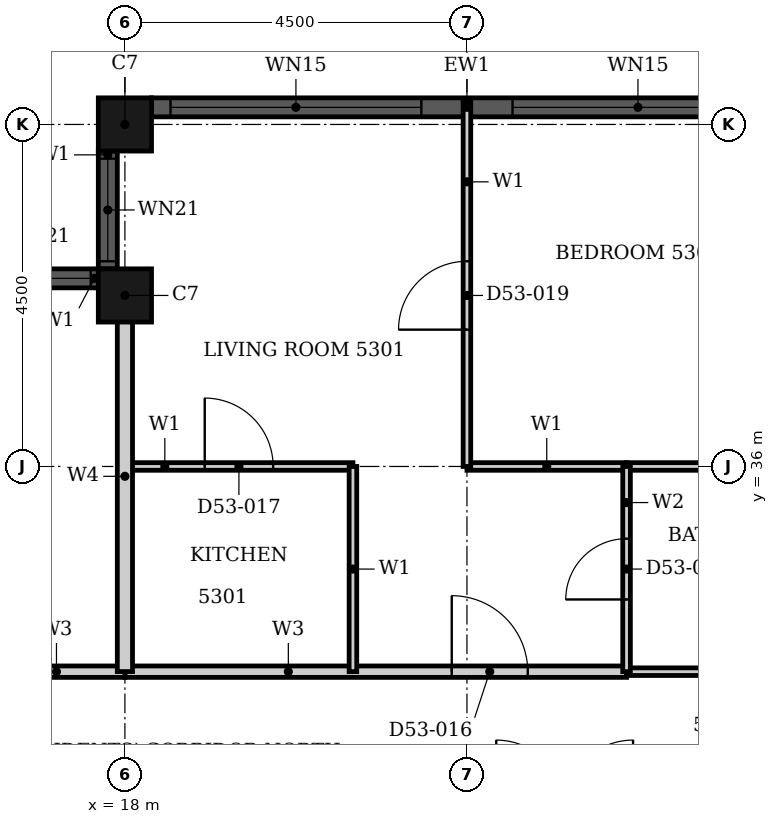
"""IFC4 building model, lengths in metres.
Left out: names, types, materials, properties, quantities, classifications, styles, units other than length and angle.
Written with IfcOpenShell. Run it as: python <this file> out.ifc"""

import sys

from ifc_helpers import new_model, si_unit, direction, frame, frame_2d, origin, origin_2d, place, context, subcontext, project, spatial, rectangle, hollow_rectangle, extrude, element, fill, save


model = new_model("IFC4")
c1 = context("Model", 3, precision=1e-05, world=origin(), true_north=direction((0.0, 1.0)))
c2 = subcontext(c1, "Body", "Model", "MODEL_VIEW")
j1 = project(units=[si_unit("LENGTHUNIT", "METRE"), si_unit("PLANEANGLEUNIT", "RADIAN")], contexts=[c1])
p1 = place(None, origin())
s1 = spatial("IfcSite", under=j1, at=p1, CompositionType="ELEMENT")
p2 = place(p1, origin())
s2 = spatial("IfcBuilding", under=s1, at=p2, CompositionType="ELEMENT")
p3 = place(p2, frame((0.0, 0.0, 210.9)))
s3 = spatial("IfcBuildingStorey", under=s2, at=p3, CompositionType="ELEMENT", Elevation=210.9)
for number, where, z_axis, x_axis in (
    (1, (18.0, 40.5, 0.0), (0.0, 0.0, 1.0), (1.0, 0.0, 0.0)),
    (2, (18.0, 38.25, 0.0), (0.0, 0.0, 1.0), (1.0, 0.0, 0.0)),
):
    element("IfcColumn", number, at=place(p3, frame(where, z_axis=z_axis, x_axis=x_axis)), inside=s3, PredefinedType="COLUMN", context=c2, shape_type="SweptSolid", body=[
        extrude(hollow_rectangle(XDim=0.7, YDim=0.7, WallThickness=0.022, at=origin_2d()), origin(), (0.0, 0.0, 1.0), 3.7),
    ])
p4 = place(p3, frame((26.65, 40.725, 0.0), z_axis=(0.0, 0.0, 1.0), x_axis=(-1.0, 0.0, 0.0)))
e3 = element("IfcWall", 3, at=p4, inside=s3, PredefinedType="SOLIDWALL", context=c2, shape_type="SweptSolid", body=[
    extrude(rectangle(XDim=8.3, YDim=0.25, at=frame_2d((4.15, 0.0))), origin(), (0.0, 0.0, 1.0), 3.7),
])
p5 = place(p4, frame((0.25, 0.0, 0.45)))
e4 = element("IfcOpeningElement", 4, at=p5, cuts=e3, PredefinedType="OPENING", context=c2, shape_type="SweptSolid", body=[
    extrude(rectangle(XDim=3.3, YDim=2.3, at=frame_2d((1.65, 1.15))), frame((0.0, 0.135, 0.0), z_axis=(0.0, -1.0, 0.0), x_axis=(1.0, 0.0, 0.0)), (0.0, 0.0, 1.0), 0.27),
])
p6 = place(p4, frame((4.75, 0.0, 0.45)))
e5 = element("IfcOpeningElement", 5, at=p6, cuts=e3, PredefinedType="OPENING", context=c2, shape_type="SweptSolid", body=[
    extrude(rectangle(XDim=3.3, YDim=2.3, at=frame_2d((1.65, 1.15))), frame((0.0, 0.135, 0.0), z_axis=(0.0, -1.0, 0.0), x_axis=(1.0, 0.0, 0.0)), (0.0, 0.0, 1.0), 0.27),
])
p7 = place(p3, frame((17.775, 40.15, 0.0), z_axis=(0.0, 0.0, 1.0), x_axis=(0.0, -1.0, 0.0)))
e6 = element("IfcWall", 6, at=p7, inside=s3, PredefinedType="SOLIDWALL", context=c2, shape_type="SweptSolid", body=[
    extrude(rectangle(XDim=1.55, YDim=0.25, at=frame_2d((0.775, 0.0))), origin(), (0.0, 0.0, 1.0), 3.7),
])
p8 = place(p7, frame((0.1, 0.0, 0.9)))
e7 = element("IfcOpeningElement", 7, at=p8, cuts=e6, PredefinedType="OPENING", context=c2, shape_type="SweptSolid", body=[
    extrude(rectangle(XDim=1.35, YDim=1.85, at=frame_2d((0.675, 0.925))), frame((0.0, 0.135, 0.0), z_axis=(0.0, -1.0, 0.0), x_axis=(1.0, 0.0, 0.0)), (0.0, 0.0, 1.0), 0.27),
])
p9 = place(p3, frame((17.65, 38.475, 0.0), z_axis=(0.0, 0.0, 1.0), x_axis=(-1.0, 0.0, 0.0)))
e8 = element("IfcWall", 8, at=p9, inside=s3, PredefinedType="SOLIDWALL", context=c2, shape_type="SweptSolid", body=[
    extrude(rectangle(XDim=1.55, YDim=0.25, at=frame_2d((0.775, 0.0))), origin(), (0.0, 0.0, 1.0), 3.7),
])
p10 = place(p9, frame((0.1, 0.0, 0.9)))
e9 = element("IfcOpeningElement", 9, at=p10, cuts=e8, PredefinedType="OPENING", context=c2, shape_type="SweptSolid", body=[
    extrude(rectangle(XDim=1.35, YDim=1.85, at=frame_2d((0.675, 0.925))), frame((0.0, 0.135, 0.0), z_axis=(0.0, -1.0, 0.0), x_axis=(1.0, 0.0, 0.0)), (0.0, 0.0, 1.0), 0.27),
])
p11 = place(p3, frame((18.0, 33.3, 0.0), z_axis=(0.0, 0.0, 1.0), x_axis=(1.0, 0.0, 0.0)))
e10 = element("IfcWall", 10, at=p11, inside=s3, PredefinedType="PARTITIONING", context=c2, shape_type="SweptSolid", body=[
    extrude(rectangle(XDim=6.6, YDim=0.15, at=frame_2d((3.3, 0.0))), origin(), (0.0, 0.0, 1.0), 3.4),
])
p12 = place(p11, frame((4.3, 0.0, 0.0)))
e11 = element("IfcOpeningElement", 11, at=p12, cuts=e10, PredefinedType="OPENING", context=c2, shape_type="SweptSolid", body=[
    extrude(rectangle(XDim=1.0, YDim=2.2, at=frame_2d((0.5, 1.1))), frame((0.0, 0.085, 0.0), z_axis=(0.0, -1.0, 0.0), x_axis=(1.0, 0.0, 0.0)), (0.0, 0.0, 1.0), 0.17),
])
p13 = place(p3, frame((16.2, 33.3, 0.0), z_axis=(0.0, 0.0, 1.0), x_axis=(1.0, 0.0, 0.0)))
e12 = element("IfcWall", 12, at=p13, inside=s3, PredefinedType="PARTITIONING", context=c2, shape_type="SweptSolid", body=[
    extrude(rectangle(XDim=1.799, YDim=0.15, at=frame_2d((0.899, 0.0))), origin(), (0.0, 0.0, 1.0), 3.4),
])
p14 = place(p3, frame((22.5, 36.0, 0.0), z_axis=(0.0, 0.0, 1.0), x_axis=(1.0, 0.0, 0.0)))
e13 = element("IfcWall", 13, at=p14, inside=s3, PredefinedType="PARTITIONING", context=c2, shape_type="SweptSolid", body=[
    extrude(rectangle(XDim=2.1, YDim=0.1, at=frame_2d((1.05, 0.0))), origin(), (0.0, 0.0, 1.0), 3.4),
])
p15 = place(p3, frame((18.0, 36.0, 0.0), z_axis=(0.0, 0.0, 1.0), x_axis=(1.0, 0.0, 0.0)))
e14 = element("IfcWall", 14, at=p15, inside=s3, PredefinedType="PARTITIONING", context=c2, shape_type="SweptSolid", body=[
    extrude(rectangle(XDim=3.0, YDim=0.1, at=frame_2d((1.5, 0.0))), origin(), (0.0, 0.0, 1.0), 3.4),
])
p16 = place(p15, frame((1.05, 0.0, 0.0)))
e15 = element("IfcOpeningElement", 15, at=p16, cuts=e14, PredefinedType="OPENING", context=c2, shape_type="SweptSolid", body=[
    extrude(rectangle(XDim=0.9, YDim=2.1, at=frame_2d((0.45, 1.05))), frame((0.0, 0.06, 0.0), z_axis=(0.0, -1.0, 0.0), x_axis=(1.0, 0.0, 0.0)), (0.0, 0.0, 1.0), 0.12),
])
p17 = place(p3, frame((21.0, 33.3, 0.0), z_axis=(0.0, 0.0, 1.0), x_axis=(0.0, 1.0, 0.0)))
e16 = element("IfcWall", 16, at=p17, inside=s3, PredefinedType="PARTITIONING", context=c2, shape_type="SweptSolid", body=[
    extrude(rectangle(XDim=2.7, YDim=0.1, at=frame_2d((1.35, 0.0))), origin(), (0.0, 0.0, 1.0), 3.4),
])
p18 = place(p3, frame((22.5, 36.0, 0.0), z_axis=(0.0, 0.0, 1.0), x_axis=(0.0, 1.0, 0.0)))
e17 = element("IfcWall", 17, at=p18, inside=s3, PredefinedType="PARTITIONING", context=c2, shape_type="SweptSolid", body=[
    extrude(rectangle(XDim=4.79, YDim=0.1, at=frame_2d((2.395, 0.0))), origin(), (0.0, 0.0, 1.0), 3.4),
])
p19 = place(p18, frame((1.8, 0.0, 0.0)))
e18 = element("IfcOpeningElement", 18, at=p19, cuts=e17, PredefinedType="OPENING", context=c2, shape_type="SweptSolid", body=[
    extrude(rectangle(XDim=0.9, YDim=2.1, at=frame_2d((0.45, 1.05))), frame((0.0, 0.06, 0.0), z_axis=(0.0, -1.0, 0.0), x_axis=(1.0, 0.0, 0.0)), (0.0, 0.0, 1.0), 0.12),
])
p20 = place(p3, frame((18.0, 33.301, 0.0), z_axis=(0.0, 0.0, 1.0), x_axis=(0.0, 1.0, 0.0)))
e19 = element("IfcWall", 19, at=p20, inside=s3, PredefinedType="PARTITIONING", context=c2, shape_type="SweptSolid", body=[
    extrude(rectangle(XDim=5.139, YDim=0.2, at=frame_2d((2.569, 0.0))), origin(), (0.0, 0.0, 1.0), 3.4),
])
for number, where, z_axis, x_axis in (
    (20, (24.6, 33.3, 0.0), (0.0, 0.0, 1.0), (1.0, 0.0, 0.0)),
    (21, (24.6, 36.0, 0.0), (0.0, 0.0, 1.0), (1.0, 0.0, 0.0)),
):
    element("IfcWall", number, at=place(p3, frame(where, z_axis=z_axis, x_axis=x_axis)), inside=s3, PredefinedType="PARTITIONING", context=c2, shape_type="SweptSolid", body=[
        extrude(rectangle(XDim=2.4, YDim=0.1, at=frame_2d((1.2, 0.0))), origin(), (0.0, 0.0, 1.0), 3.4),
    ])
p21 = place(p3, frame((24.6, 33.3, 0.0), z_axis=(0.0, 0.0, 1.0), x_axis=(0.0, 1.0, 0.0)))
e22 = element("IfcWall", 22, at=p21, inside=s3, PredefinedType="PARTITIONING", context=c2, shape_type="SweptSolid", body=[
    extrude(rectangle(XDim=2.7, YDim=0.1, at=frame_2d((1.35, 0.0))), origin(), (0.0, 0.0, 1.0), 3.4),
])
p22 = place(p21, frame((0.95, 0.0, 0.0)))
e23 = element("IfcOpeningElement", 23, at=p22, cuts=e22, PredefinedType="OPENING", context=c2, shape_type="SweptSolid", body=[
    extrude(rectangle(XDim=0.8, YDim=2.1, at=frame_2d((0.4, 1.05))), frame((0.0, 0.06, 0.0), z_axis=(0.0, -1.0, 0.0), x_axis=(1.0, 0.0, 0.0)), (0.0, 0.0, 1.0), 0.12),
])
p23 = place(p5, origin())
e24 = element("IfcWindow", 24, at=p23, inside=s3, PartitioningType="SINGLE_PANEL", PredefinedType="WINDOW", context=c2, shape_type="SweptSolid", body=[
    extrude(rectangle(XDim=3.3, YDim=2.3, at=frame_2d((1.65, 1.15))), frame((0.0, 0.03, 0.0), z_axis=(0.0, -1.0, 0.0), x_axis=(1.0, 0.0, 0.0)), (0.0, 0.0, 1.0), 0.06),
])
fill(e4, e24)
p24 = place(p6, origin())
e25 = element("IfcWindow", 25, at=p24, inside=s3, PartitioningType="SINGLE_PANEL", PredefinedType="WINDOW", context=c2, shape_type="SweptSolid", body=[
    extrude(rectangle(XDim=3.3, YDim=2.3, at=frame_2d((1.65, 1.15))), frame((0.0, 0.03, 0.0), z_axis=(0.0, -1.0, 0.0), x_axis=(1.0, 0.0, 0.0)), (0.0, 0.0, 1.0), 0.06),
])
fill(e5, e25)
p25 = place(p8, origin())
e26 = element("IfcWindow", 26, at=p25, inside=s3, PartitioningType="SINGLE_PANEL", PredefinedType="WINDOW", context=c2, shape_type="SweptSolid", body=[
    extrude(rectangle(XDim=1.35, YDim=1.85, at=frame_2d((0.675, 0.925))), frame((0.0, 0.03, 0.0), z_axis=(0.0, -1.0, 0.0), x_axis=(1.0, 0.0, 0.0)), (0.0, 0.0, 1.0), 0.06),
])
fill(e7, e26)
p26 = place(p10, origin())
e27 = element("IfcWindow", 27, at=p26, inside=s3, PartitioningType="SINGLE_PANEL", PredefinedType="WINDOW", context=c2, shape_type="SweptSolid", body=[
    extrude(rectangle(XDim=1.35, YDim=1.85, at=frame_2d((0.675, 0.925))), frame((0.0, 0.03, 0.0), z_axis=(0.0, -1.0, 0.0), x_axis=(1.0, 0.0, 0.0)), (0.0, 0.0, 1.0), 0.06),
])
fill(e9, e27)
p27 = place(p12, origin())
e28 = element("IfcDoor", 28, at=p27, inside=s3, OperationType="SINGLE_SWING_RIGHT", PredefinedType="DOOR", context=c2, shape_type="SweptSolid", body=[
    extrude(rectangle(XDim=1.0, YDim=2.2, at=frame_2d((0.5, 1.1))), frame((0.0, 0.025, 0.0), z_axis=(0.0, -1.0, 0.0), x_axis=(1.0, 0.0, 0.0)), (0.0, 0.0, 1.0), 0.05),
])
fill(e11, e28)
p28 = place(p16, origin())
e29 = element("IfcDoor", 29, at=p28, inside=s3, OperationType="SINGLE_SWING_RIGHT", PredefinedType="DOOR", context=c2, shape_type="SweptSolid", body=[
    extrude(rectangle(XDim=0.9, YDim=2.1, at=frame_2d((0.45, 1.05))), frame((0.0, 0.025, 0.0), z_axis=(0.0, -1.0, 0.0), x_axis=(1.0, 0.0, 0.0)), (0.0, 0.0, 1.0), 0.05),
])
fill(e15, e29)
p29 = place(p22, origin())
e30 = element("IfcDoor", 30, at=p29, inside=s3, OperationType="SINGLE_SWING_RIGHT", PredefinedType="DOOR", context=c2, shape_type="SweptSolid", body=[
    extrude(rectangle(XDim=0.8, YDim=2.1, at=frame_2d((0.4, 1.05))), frame((0.0, 0.025, 0.0), z_axis=(0.0, -1.0, 0.0), x_axis=(1.0, 0.0, 0.0)), (0.0, 0.0, 1.0), 0.05),
])
fill(e23, e30)
p30 = place(p19, origin())
e31 = element("IfcDoor", 31, at=p30, inside=s3, OperationType="SINGLE_SWING_LEFT", PredefinedType="DOOR", context=c2, shape_type="SweptSolid", body=[
    extrude(rectangle(XDim=0.9, YDim=2.1, at=frame_2d((0.45, 1.05))), frame((0.0, 0.025, 0.0), z_axis=(0.0, -1.0, 0.0), x_axis=(1.0, 0.0, 0.0)), (0.0, 0.0, 1.0), 0.05),
])
fill(e18, e31)
save(model, sys.argv[1])
